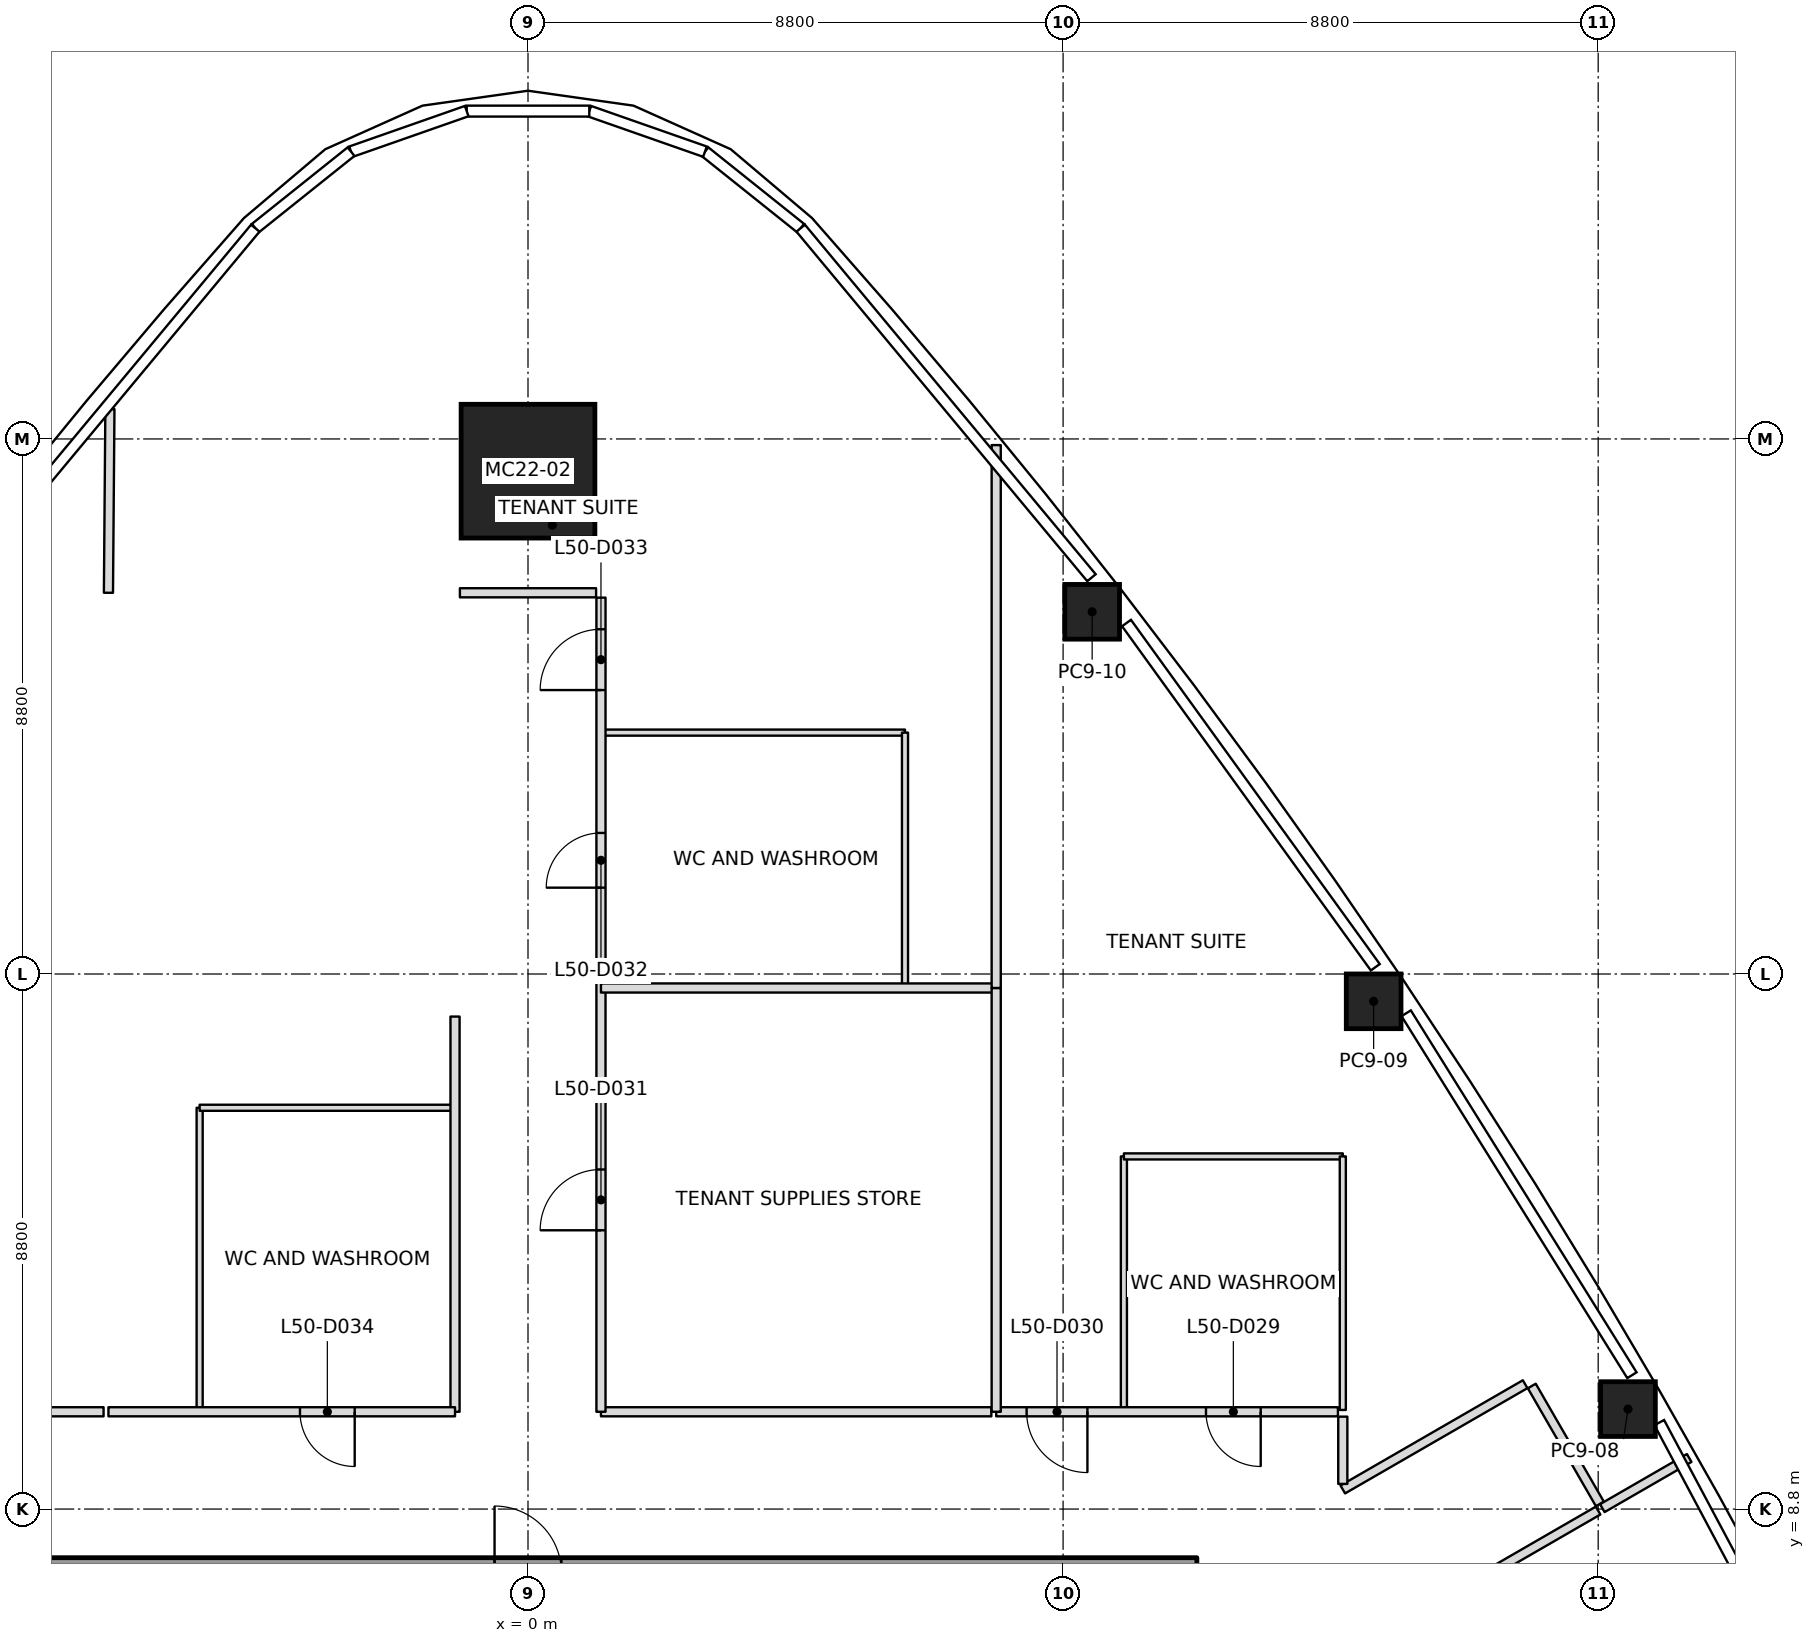
"""IFC4 building model, lengths in metres.
Left out: names, types, materials, properties, quantities, classifications, styles, units other than length and angle.
Written with IfcOpenShell. Run it as: python <this file> out.ifc"""

import sys

from ifc_helpers import new_model, si_unit, direction, frame, frame_2d, origin, origin_2d, place, context, subcontext, project, spatial, rectangle, extrude, clip, halfspace, element, fill, save


model = new_model("IFC4")
c1 = context("Model", 3, precision=1e-05, world=origin(), true_north=direction((0.0, 1.0)))
c2 = subcontext(c1, "Body", "Model", "MODEL_VIEW")
j1 = project(units=[si_unit("LENGTHUNIT", "METRE"), si_unit("PLANEANGLEUNIT", "RADIAN")], contexts=[c1])
p1 = place(None, origin())
s1 = spatial("IfcSite", under=j1, at=p1, CompositionType="ELEMENT")
p2 = place(p1, origin())
s2 = spatial("IfcBuilding", under=s1, at=p2, CompositionType="ELEMENT")
p3 = place(p2, frame((0.0, 0.0, 227.0)))
s3 = spatial("IfcBuildingStorey", under=s2, at=p3, CompositionType="ELEMENT", Elevation=227.0)
p4 = place(p3, frame((0.0, 25.87, 0.0), z_axis=(0.0, -0.032209841054, 0.999481128456), x_axis=(1.0, 0.0, 0.0)))
e1 = element("IfcColumn", 1, at=p4, inside=s3, PredefinedType="COLUMN", context=c2, shape_type="SweptSolid", body=[
    clip(extrude(rectangle(XDim=2.2, YDim=2.2, at=origin_2d()), origin(), (0.0, 0.0, 1.0), 4.002), halfspace(frame((0.0, 0.0, 0.008)), True)),
])
p5 = place(p3, frame((18.09, 10.444, 0.0), z_axis=(-0.009948074445, -0.005736926367, 0.999934059571), x_axis=(-0.499975258342, 0.8660396879, -5.385525e-06)))
e2 = element("IfcColumn", 2, at=p5, inside=s3, PredefinedType="COLUMN", context=c2, shape_type="SweptSolid", body=[
    clip(extrude(rectangle(XDim=0.9, YDim=0.9, at=origin_2d()), origin(), (0.0, 0.0, 1.0), 4.0), halfspace(frame((0.0, 0.0, 0.001)), True)),
])
p6 = place(p3, frame((13.907, 17.151, 0.0), z_axis=(-0.005248490815, -0.013243284963, 0.999898529226), x_axis=(-0.557760604699, 0.829962689553, 0.008064849343)))
e3 = element("IfcColumn", 3, at=p6, inside=s3, PredefinedType="COLUMN", context=c2, shape_type="SweptSolid", body=[
    clip(extrude(rectangle(XDim=0.9, YDim=0.9, at=origin_2d()), origin(), (0.0, 0.0, 1.0), 4.0), halfspace(frame((0.0, 0.0, 0.002)), True)),
])
p7 = place(p3, frame((9.278, 23.557, 0.0), z_axis=(-0.000244089904, -0.020381506962, 0.999792245716), x_axis=(-0.612951165018, 0.789959701895, 0.015954268541)))
e4 = element("IfcColumn", 4, at=p7, inside=s3, PredefinedType="COLUMN", context=c2, shape_type="SweptSolid", body=[
    clip(extrude(rectangle(XDim=0.9, YDim=0.9, at=origin_2d()), origin(), (0.0, 0.0, 1.0), 4.001), halfspace(frame((0.0, 0.0, 0.003)), True)),
])
p8 = place(p3, frame((-11.0, 7.75, 0.0), z_axis=(0.0, 0.0, 1.0), x_axis=(1.0, 0.0, 0.0)))
e5 = element("IfcWall", 5, at=p8, inside=s3, PredefinedType="SHEAR", context=c2, shape_type="SweptSolid", body=[
    extrude(rectangle(XDim=22.0, YDim=0.5, at=frame_2d((11.0, 0.0))), origin(), (0.0, 0.0, 1.0), 4.0),
])
p9 = place(p8, frame((10.45, 0.0, 0.0)))
e6 = element("IfcOpeningElement", 6, at=p9, cuts=e5, PredefinedType="OPENING", context=c2, shape_type="SweptSolid", body=[
    extrude(rectangle(XDim=1.1, YDim=2.1, at=frame_2d((0.55, 1.05))), frame((0.0, 0.25, 0.0), z_axis=(0.0, -1.0, 0.0), x_axis=(1.0, 0.0, 0.0)), (0.0, 0.0, 1.0), 0.5),
])
p10 = place(p3, frame((-6.9, 23.87, 0.0), z_axis=(0.0, 0.0, 1.0), x_axis=(0.007997805274, 0.999968017044, 0.0)))
e7 = element("IfcWall", 7, at=p10, inside=s3, PredefinedType="PARTITIONING", context=c2, shape_type="SweptSolid", body=[
    extrude(rectangle(XDim=3.022, YDim=0.15, at=frame_2d((1.511, 0.0))), origin(), (0.0, 0.0, 1.0), 3.234),
])
p11 = place(p3, frame((1.2, 17.37, 0.0), z_axis=(0.0, 0.0, 1.0), x_axis=(1.0, 0.0, 0.0)))
e8 = element("IfcWall", 8, at=p11, inside=s3, PredefinedType="PARTITIONING", context=c2, shape_type="SweptSolid", body=[
    extrude(rectangle(XDim=6.5, YDim=0.15, at=frame_2d((3.25, 0.0))), origin(), (0.0, 0.0, 1.0), 3.317),
])
p12 = place(p3, frame((7.7, 10.4, 0.0), z_axis=(0.0, 0.0, 1.0), x_axis=(0.0, 1.0, 0.0)))
e9 = element("IfcWall", 9, at=p12, inside=s3, PredefinedType="PARTITIONING", context=c2, shape_type="SweptSolid", body=[
    extrude(rectangle(XDim=6.97, YDim=0.15, at=frame_2d((3.485, 0.0))), origin(), (0.0, 0.0, 1.0), 3.317),
])
p13 = place(p3, frame((7.7, 17.37, 0.0), z_axis=(0.0, 0.0, 1.0), x_axis=(0.0, 1.0, 0.0)))
e10 = element("IfcWall", 10, at=p13, inside=s3, PredefinedType="PARTITIONING", context=c2, shape_type="SweptSolid", body=[
    extrude(rectangle(XDim=8.929, YDim=0.15, at=frame_2d((4.464, 0.0))), origin(), (0.0, 0.0, 1.0), 3.234),
])
p14 = place(p3, frame((19.097, 9.64, 0.0), z_axis=(0.0, 0.0, 1.0), x_axis=(-0.866067297121, -0.499927431592, 0.0)))
e11 = element("IfcWall", 11, at=p14, inside=s3, PredefinedType="PARTITIONING", context=c2, shape_type="SweptSolid", body=[
    extrude(rectangle(XDim=1.65, YDim=0.15, at=frame_2d((0.825, 0.0))), origin(), (0.0, 0.0, 1.0), 3.234),
])
p15 = place(p3, frame((-6.98, 10.4, 0.0), z_axis=(0.0, 0.0, 1.0), x_axis=(-1.0, 0.0, 0.0)))
e12 = element("IfcWall", 12, at=p15, inside=s3, PredefinedType="PARTITIONING", context=c2, shape_type="SweptSolid", body=[
    extrude(rectangle(XDim=6.34, YDim=0.15, at=frame_2d((3.17, 0.0))), origin(), (0.0, 0.0, 1.0), 3.317),
])
p16 = place(p15, frame((1.97, 0.0, 0.0)))
e13 = element("IfcOpeningElement", 13, at=p16, cuts=e12, PredefinedType="OPENING", context=c2, shape_type="SweptSolid", body=[
    extrude(rectangle(XDim=1.0, YDim=2.1, at=frame_2d((0.5, 1.05))), frame((0.0, 0.075, 0.0), z_axis=(0.0, -1.0, 0.0), x_axis=(1.0, 0.0, 0.0)), (0.0, 0.0, 1.0), 0.15),
])
p17 = place(p3, frame((-1.2, 16.9, 0.0), z_axis=(0.0, 0.0, 1.0), x_axis=(0.0, -1.0, 0.0)))
e14 = element("IfcWall", 14, at=p17, inside=s3, PredefinedType="PARTITIONING", context=c2, shape_type="SweptSolid", body=[
    extrude(rectangle(XDim=6.5, YDim=0.15, at=frame_2d((3.25, 0.0))), origin(), (0.0, 0.0, 1.0), 3.317),
])
p18 = place(p3, frame((-1.2, 10.4, 0.0), z_axis=(0.0, 0.0, 1.0), x_axis=(-1.0, 0.0, 0.0)))
e15 = element("IfcWall", 15, at=p18, inside=s3, PredefinedType="PARTITIONING", context=c2, shape_type="SweptSolid", body=[
    extrude(rectangle(XDim=5.7, YDim=0.15, at=frame_2d((2.85, 0.0))), origin(), (0.0, 0.0, 1.0), 3.45),
])
p19 = place(p18, frame((1.65, 0.0, 0.0)))
e16 = element("IfcOpeningElement", 16, at=p19, cuts=e15, PredefinedType="OPENING", context=c2, shape_type="SweptSolid", body=[
    extrude(rectangle(XDim=0.9, YDim=2.1, at=frame_2d((0.45, 1.05))), frame((0.0, 0.075, 0.0), z_axis=(0.0, -1.0, 0.0), x_axis=(1.0, 0.0, 0.0)), (0.0, 0.0, 1.0), 0.15),
])
p20 = place(p3, frame((1.12, 23.87, 0.0), z_axis=(0.0, 0.0, 1.0), x_axis=(-1.0, 0.0, 0.0)))
e17 = element("IfcWall", 17, at=p20, inside=s3, PredefinedType="PARTITIONING", context=c2, shape_type="SweptSolid", body=[
    extrude(rectangle(XDim=2.24, YDim=0.15, at=frame_2d((1.12, 0.0))), origin(), (0.0, 0.0, 1.0), 3.233),
])
p21 = place(p3, frame((7.62, 10.4, 0.0), z_axis=(0.0, 0.0, 1.0), x_axis=(-1.0, 0.0, 0.0)))
e18 = element("IfcWall", 18, at=p21, inside=s3, PredefinedType="PARTITIONING", context=c2, shape_type="SweptSolid", body=[
    extrude(rectangle(XDim=6.42, YDim=0.15, at=frame_2d((3.21, 0.0))), origin(), (0.0, 0.0, 1.0), 3.45),
])
p22 = place(p3, frame((1.2, 10.4, 0.0), z_axis=(0.0, 0.0, 1.0), x_axis=(0.0, 1.0, 0.0)))
e19 = element("IfcWall", 19, at=p22, inside=s3, PredefinedType="PARTITIONING", context=c2, shape_type="SweptSolid", body=[
    extrude(rectangle(XDim=13.39, YDim=0.15, at=frame_2d((6.695, 0.0))), origin(), (0.0, 0.0, 1.0), 3.317),
])
p23 = place(p22, frame((2.985, 0.0, 0.0)))
e20 = element("IfcOpeningElement", 20, at=p23, cuts=e19, PredefinedType="OPENING", context=c2, shape_type="SweptSolid", body=[
    extrude(rectangle(XDim=1.0, YDim=2.1, at=frame_2d((0.5, 1.05))), frame((0.0, 0.075, 0.0), z_axis=(0.0, -1.0, 0.0), x_axis=(1.0, 0.0, 0.0)), (0.0, 0.0, 1.0), 0.15),
])
p24 = place(p22, frame((8.62, 0.0, 0.0)))
e21 = element("IfcOpeningElement", 21, at=p24, cuts=e19, PredefinedType="OPENING", context=c2, shape_type="SweptSolid", body=[
    extrude(rectangle(XDim=0.9, YDim=2.1, at=frame_2d((0.45, 1.05))), frame((0.0, 0.075, 0.0), z_axis=(0.0, -1.0, 0.0), x_axis=(1.0, 0.0, 0.0)), (0.0, 0.0, 1.0), 0.15),
])
p25 = place(p22, frame((11.87, 0.0, 0.0)))
e22 = element("IfcOpeningElement", 22, at=p25, cuts=e19, PredefinedType="OPENING", context=c2, shape_type="SweptSolid", body=[
    extrude(rectangle(XDim=1.0, YDim=2.1, at=frame_2d((0.5, 1.05))), frame((0.0, 0.075, 0.0), z_axis=(0.0, -1.0, 0.0), x_axis=(1.0, 0.0, 0.0)), (0.0, 0.0, 1.0), 0.15),
])
p26 = place(p3, frame((13.32, 10.4, 0.0), z_axis=(0.0, 0.0, 1.0), x_axis=(-1.0, 0.0, 0.0)))
e23 = element("IfcWall", 23, at=p26, inside=s3, PredefinedType="PARTITIONING", context=c2, shape_type="SweptSolid", body=[
    extrude(rectangle(XDim=5.62, YDim=0.15, at=frame_2d((2.81, 0.0))), origin(), (0.0, 0.0, 1.0), 3.317),
])
p27 = place(p26, frame((1.27, 0.0, 0.0)))
e24 = element("IfcOpeningElement", 24, at=p27, cuts=e23, PredefinedType="OPENING", context=c2, shape_type="SweptSolid", body=[
    extrude(rectangle(XDim=0.9, YDim=2.1, at=frame_2d((0.45, 1.05))), frame((0.0, 0.075, 0.0), z_axis=(0.0, -1.0, 0.0), x_axis=(1.0, 0.0, 0.0)), (0.0, 0.0, 1.0), 0.15),
])
p28 = place(p26, frame((4.12, 0.0, 0.0)))
e25 = element("IfcOpeningElement", 25, at=p28, cuts=e23, PredefinedType="OPENING", context=c2, shape_type="SweptSolid", body=[
    extrude(rectangle(XDim=1.0, YDim=2.1, at=frame_2d((0.5, 1.05))), frame((0.0, 0.075, 0.0), z_axis=(0.0, -1.0, 0.0), x_axis=(1.0, 0.0, 0.0)), (0.0, 0.0, 1.0), 0.15),
])
p29 = place(p3, frame((16.399, 10.854, 0.0), z_axis=(0.0, 0.0, 1.0), x_axis=(-0.866012988868, -0.50002150265, 0.0)))
e26 = element("IfcWall", 26, at=p29, inside=s3, PredefinedType="PARTITIONING", context=c2, shape_type="SweptSolid", body=[
    extrude(rectangle(XDim=3.463, YDim=0.15, at=frame_2d((1.731, 0.0))), origin(), (0.0, 0.0, 1.0), 3.45),
])
p30 = place(p3, frame((13.4, 9.214, 0.0), z_axis=(0.0, 0.0, 1.0), x_axis=(0.0, 1.0, 0.0)))
e27 = element("IfcWall", 27, at=p30, inside=s3, PredefinedType="PARTITIONING", context=c2, shape_type="SweptSolid", body=[
    extrude(rectangle(XDim=1.106, YDim=0.15, at=frame_2d((0.553, 0.0))), origin(), (0.0, 0.0, 1.0), 3.45),
])
p31 = place(p3, frame((17.628, 8.884, 0.0), z_axis=(0.0, 0.0, 1.0), x_axis=(-0.500030632641, 0.866007717299, 0.0)))
e28 = element("IfcWall", 28, at=p31, inside=s3, PredefinedType="PARTITIONING", context=c2, shape_type="SweptSolid", body=[
    extrude(rectangle(XDim=2.24, YDim=0.15, at=frame_2d((1.12, 0.0))), origin(), (0.0, 0.0, 1.0), 3.45),
])
p32 = place(p3, frame((13.4, 6.351, 0.0), z_axis=(0.0, 0.0, 1.0), x_axis=(0.866022073929, 0.500005767435, 0.0)))
e29 = element("IfcWall", 29, at=p32, inside=s3, PredefinedType="PARTITIONING", context=c2, shape_type="SweptSolid", body=[
    extrude(rectangle(XDim=4.849, YDim=0.15, at=frame_2d((2.424, 0.0))), origin(), (0.0, 0.0, 1.0), 3.45),
])
p33 = place(p3, frame((-5.4, 10.43, 0.0), z_axis=(0.0, 0.0, 1.0), x_axis=(0.0, 1.0, 0.0)))
e30 = element("IfcWall", 30, at=p33, inside=s3, PredefinedType="PARTITIONING", context=c2, shape_type="SweptSolid", body=[
    extrude(rectangle(XDim=4.97, YDim=0.1, at=frame_2d((2.485, 0.0))), origin(), (0.0, 0.0, 1.0), 3.45),
])
p34 = place(p3, frame((-5.4, 15.4, 0.0), z_axis=(0.0, 0.0, 1.0), x_axis=(1.0, 0.0, 0.0)))
e31 = element("IfcWall", 31, at=p34, inside=s3, PredefinedType="PARTITIONING", context=c2, shape_type="SweptSolid", body=[
    extrude(rectangle(XDim=4.17, YDim=0.1, at=frame_2d((2.085, 0.0))), origin(), (0.0, 0.0, 1.0), 3.317),
])
p35 = place(p3, frame((1.23, 21.57, 0.0), z_axis=(0.0, 0.0, 1.0), x_axis=(1.0, 0.0, 0.0)))
e32 = element("IfcWall", 32, at=p35, inside=s3, PredefinedType="PARTITIONING", context=c2, shape_type="SweptSolid", body=[
    extrude(rectangle(XDim=4.97, YDim=0.1, at=frame_2d((2.485, 0.0))), origin(), (0.0, 0.0, 1.0), 3.45),
])
p36 = place(p3, frame((6.2, 21.57, 0.0), z_axis=(0.0, 0.0, 1.0), x_axis=(0.0, -1.0, 0.0)))
e33 = element("IfcWall", 33, at=p36, inside=s3, PredefinedType="PARTITIONING", context=c2, shape_type="SweptSolid", body=[
    extrude(rectangle(XDim=4.17, YDim=0.1, at=frame_2d((2.085, 0.0))), origin(), (0.0, 0.0, 1.0), 3.393),
])
p37 = place(p3, frame((9.8, 10.43, 0.0), z_axis=(0.0, 0.0, 1.0), x_axis=(0.0, 1.0, 0.0)))
e34 = element("IfcWall", 34, at=p37, inside=s3, PredefinedType="PARTITIONING", context=c2, shape_type="SweptSolid", body=[
    extrude(rectangle(XDim=4.17, YDim=0.1, at=frame_2d((2.085, 0.0))), origin(), (0.0, 0.0, 1.0), 3.317),
])
p38 = place(p3, frame((9.8, 14.6, 0.0), z_axis=(0.0, 0.0, 1.0), x_axis=(1.0, 0.0, 0.0)))
e35 = element("IfcWall", 35, at=p38, inside=s3, PredefinedType="PARTITIONING", context=c2, shape_type="SweptSolid", body=[
    extrude(rectangle(XDim=3.6, YDim=0.1, at=frame_2d((1.8, 0.0))), origin(), (0.0, 0.0, 1.0), 3.45),
])
p39 = place(p3, frame((13.4, 14.6, 0.0), z_axis=(0.0, 0.0, 1.0), x_axis=(0.0, -1.0, 0.0)))
e36 = element("IfcWall", 36, at=p39, inside=s3, PredefinedType="PARTITIONING", context=c2, shape_type="SweptSolid", body=[
    extrude(rectangle(XDim=4.17, YDim=0.1, at=frame_2d((2.085, 0.0))), origin(), (0.0, 0.0, 1.0), 3.317),
])
p40 = place(p27, origin())
e37 = element("IfcDoor", 37, at=p40, inside=s3, OperationType="SINGLE_SWING_LEFT", PredefinedType="DOOR", context=c2, shape_type="SweptSolid", body=[
    extrude(rectangle(XDim=0.9, YDim=2.1, at=frame_2d((0.45, 1.05))), frame((0.0, 0.025, 0.0), z_axis=(0.0, -1.0, 0.0), x_axis=(1.0, 0.0, 0.0)), (0.0, 0.0, 1.0), 0.05),
])
fill(e24, e37)
p41 = place(p28, origin())
e38 = element("IfcDoor", 38, at=p41, inside=s3, OperationType="SINGLE_SWING_LEFT", PredefinedType="DOOR", context=c2, shape_type="SweptSolid", body=[
    extrude(rectangle(XDim=1.0, YDim=2.1, at=frame_2d((0.5, 1.05))), frame((0.0, 0.025, 0.0), z_axis=(0.0, -1.0, 0.0), x_axis=(1.0, 0.0, 0.0)), (0.0, 0.0, 1.0), 0.05),
])
fill(e25, e38)
p42 = place(p23, origin())
e39 = element("IfcDoor", 39, at=p42, inside=s3, OperationType="SINGLE_SWING_RIGHT", PredefinedType="DOOR", context=c2, shape_type="SweptSolid", body=[
    extrude(rectangle(XDim=1.0, YDim=2.1, at=frame_2d((0.5, 1.05))), frame((0.0, 0.025, 0.0), z_axis=(0.0, -1.0, 0.0), x_axis=(1.0, 0.0, 0.0)), (0.0, 0.0, 1.0), 0.05),
])
fill(e20, e39)
p43 = place(p24, origin())
e40 = element("IfcDoor", 40, at=p43, inside=s3, OperationType="SINGLE_SWING_LEFT", PredefinedType="DOOR", context=c2, shape_type="SweptSolid", body=[
    extrude(rectangle(XDim=0.9, YDim=2.1, at=frame_2d((0.45, 1.05))), frame((0.0, 0.025, 0.0), z_axis=(0.0, -1.0, 0.0), x_axis=(1.0, 0.0, 0.0)), (0.0, 0.0, 1.0), 0.05),
])
fill(e21, e40)
p44 = place(p25, origin())
e41 = element("IfcDoor", 41, at=p44, inside=s3, OperationType="SINGLE_SWING_RIGHT", PredefinedType="DOOR", context=c2, shape_type="SweptSolid", body=[
    extrude(rectangle(XDim=1.0, YDim=2.1, at=frame_2d((0.5, 1.05))), frame((0.0, 0.025, 0.0), z_axis=(0.0, -1.0, 0.0), x_axis=(1.0, 0.0, 0.0)), (0.0, 0.0, 1.0), 0.05),
])
fill(e22, e41)
p45 = place(p19, origin())
e42 = element("IfcDoor", 42, at=p45, inside=s3, OperationType="SINGLE_SWING_LEFT", PredefinedType="DOOR", context=c2, shape_type="SweptSolid", body=[
    extrude(rectangle(XDim=0.9, YDim=2.1, at=frame_2d((0.45, 1.05))), frame((0.0, 0.025, 0.0), z_axis=(0.0, -1.0, 0.0), x_axis=(1.0, 0.0, 0.0)), (0.0, 0.0, 1.0), 0.05),
])
fill(e16, e42)
save(model, sys.argv[1])
